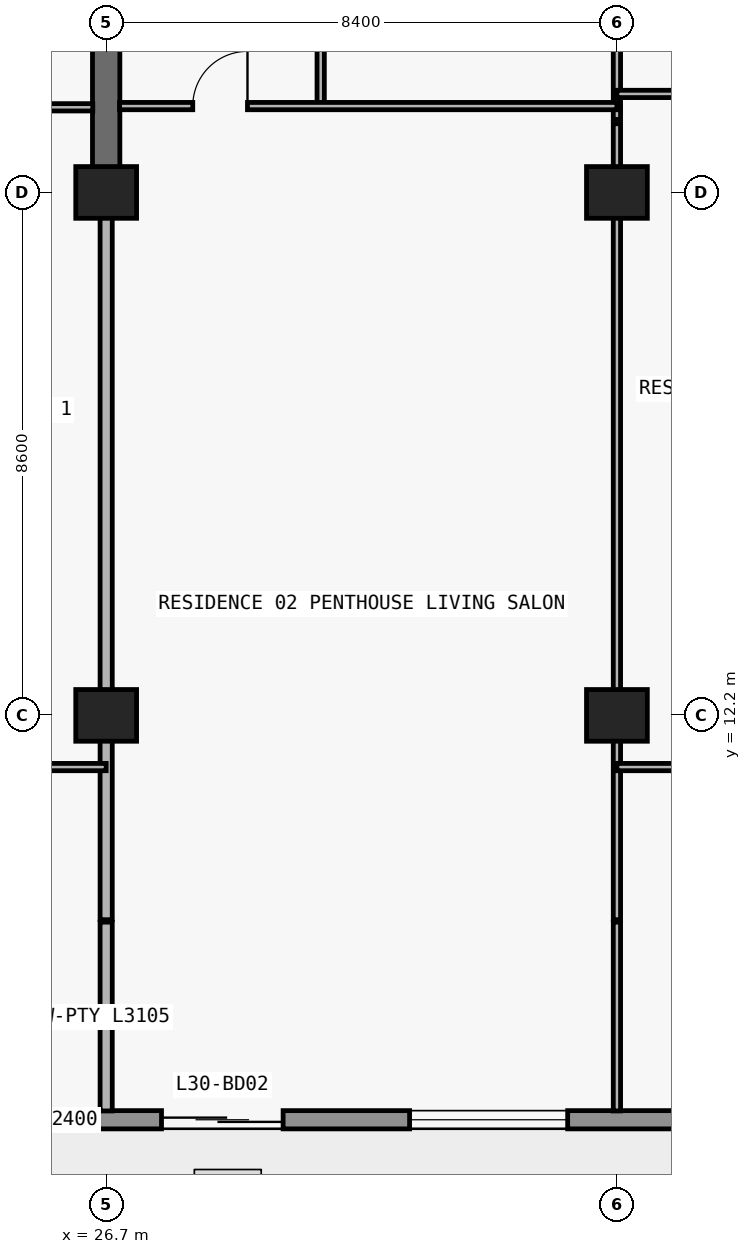
"""IFC4 building model, lengths in metres.
Left out: names, types, materials, properties, quantities, classifications, styles, units other than length and angle.
Written with IfcOpenShell. Run it as: python <this file> out.ifc"""

import sys

from ifc_helpers import new_model, si_unit, direction, frame, frame_2d, origin, origin_2d, place, context, subcontext, project, spatial, rectangle, extrude, element, fill, save


model = new_model("IFC4")
c1 = context("Model", 3, precision=1e-05, world=origin(), true_north=direction((0.0, 1.0)))
c2 = subcontext(c1, "Body", "Model", "MODEL_VIEW")
j1 = project(units=[si_unit("LENGTHUNIT", "METRE"), si_unit("PLANEANGLEUNIT", "RADIAN")], contexts=[c1])
p1 = place(None, origin())
s1 = spatial("IfcSite", under=j1, at=p1, CompositionType="ELEMENT")
p2 = place(p1, origin())
s2 = spatial("IfcBuilding", under=s1, at=p2, CompositionType="ELEMENT")
p3 = place(p2, frame((0.0, 0.0, 112.5)))
s3 = spatial("IfcBuildingStorey", under=s2, at=p3, CompositionType="ELEMENT", Elevation=112.5)
for number, where, z_axis, x_axis in (
    (1, (26.7, 12.2, 0.0), (0.0, 0.0, 1.0), (1.0, 0.0, 0.0)),
    (2, (35.1, 12.2, 0.0), (0.0, 0.0, 1.0), (1.0, 0.0, 0.0)),
    (3, (26.7, 20.8, 0.0), (0.0, 0.0, 1.0), (1.0, 0.0, 0.0)),
    (4, (35.1, 20.8, 0.0), (0.0, 0.0, 1.0), (1.0, 0.0, 0.0)),
):
    element("IfcColumn", number, at=place(p3, frame(where, z_axis=z_axis, x_axis=x_axis)), inside=s3, PredefinedType="COLUMN", context=c2, shape_type="SweptSolid", body=[
        extrude(rectangle(XDim=1.0, YDim=0.85, at=origin_2d()), origin(), (0.0, 0.0, 1.0), 3.05),
    ])
p4 = place(p3, frame((26.7, 20.8, 0.0), z_axis=(0.0, 0.0, 1.0), x_axis=(0.0, 1.0, 0.0)))
e5 = element("IfcWall", 5, at=p4, inside=s3, PredefinedType="SHEAR", context=c2, shape_type="SweptSolid", body=[
    extrude(rectangle(XDim=8.6, YDim=0.45, at=frame_2d((4.3, 0.0))), origin(), (0.0, 0.0, 1.0), 3.05),
])
p5 = place(p3, frame((70.1, 5.55, 0.0), z_axis=(0.0, 0.0, 1.0), x_axis=(-1.0, 0.0, 0.0)))
e6 = element("IfcWall", 6, at=p5, inside=s3, PredefinedType="STANDARD", context=c2, shape_type="SweptSolid", body=[
    extrude(rectangle(XDim=62.4, YDim=0.3, at=frame_2d((31.2, 0.0))), origin(), (0.0, 0.0, 1.0), 3.05),
])
p6 = place(p5, frame((57.29, 0.0, 0.0)))
e7 = element("IfcOpeningElement", 7, at=p6, cuts=e6, PredefinedType="OPENING", context=c2, shape_type="SweptSolid", body=[
    extrude(rectangle(XDim=2.0, YDim=2.3, at=frame_2d((1.0, 1.15))), frame((0.0, 0.16, 0.0), z_axis=(0.0, -1.0, 0.0), x_axis=(1.0, 0.0, 0.0)), (0.0, 0.0, 1.0), 0.32),
])
p7 = place(p5, frame((52.61, 0.0, 0.65)))
e8 = element("IfcOpeningElement", 8, at=p7, cuts=e6, PredefinedType="OPENING", context=c2, shape_type="SweptSolid", body=[
    extrude(rectangle(XDim=2.6, YDim=1.85, at=frame_2d((1.3, 0.925))), frame((0.0, 0.16, 0.0), z_axis=(0.0, -1.0, 0.0), x_axis=(1.0, 0.0, 0.0)), (0.0, 0.0, 1.0), 0.32),
])
p8 = place(p5, frame((46.5, 0.0, 0.85)))
e9 = element("IfcOpeningElement", 9, at=p8, cuts=e6, PredefinedType="OPENING", context=c2, shape_type="SweptSolid", body=[
    extrude(rectangle(XDim=2.2, YDim=1.55, at=frame_2d((1.1, 0.775))), frame((0.0, 0.16, 0.0), z_axis=(0.0, -1.0, 0.0), x_axis=(1.0, 0.0, 0.0)), (0.0, 0.0, 1.0), 0.32),
])
p9 = place(p5, frame((40.49, 0.0, 0.0)))
e10 = element("IfcOpeningElement", 10, at=p9, cuts=e6, PredefinedType="OPENING", context=c2, shape_type="SweptSolid", body=[
    extrude(rectangle(XDim=2.0, YDim=2.3, at=frame_2d((1.0, 1.15))), frame((0.0, 0.16, 0.0), z_axis=(0.0, -1.0, 0.0), x_axis=(1.0, 0.0, 0.0)), (0.0, 0.0, 1.0), 0.32),
])
p10 = place(p5, frame((35.81, 0.0, 0.65)))
e11 = element("IfcOpeningElement", 11, at=p10, cuts=e6, PredefinedType="OPENING", context=c2, shape_type="SweptSolid", body=[
    extrude(rectangle(XDim=2.6, YDim=1.85, at=frame_2d((1.3, 0.925))), frame((0.0, 0.16, 0.0), z_axis=(0.0, -1.0, 0.0), x_axis=(1.0, 0.0, 0.0)), (0.0, 0.0, 1.0), 0.32),
])
p11 = place(p5, frame((30.1, 0.0, 0.85)))
e12 = element("IfcOpeningElement", 12, at=p11, cuts=e6, PredefinedType="OPENING", context=c2, shape_type="SweptSolid", body=[
    extrude(rectangle(XDim=2.2, YDim=1.55, at=frame_2d((1.1, 0.775))), frame((0.0, 0.16, 0.0), z_axis=(0.0, -1.0, 0.0), x_axis=(1.0, 0.0, 0.0)), (0.0, 0.0, 1.0), 0.32),
])
p12 = place(p5, frame((24.426, 0.0, 0.0)))
e13 = element("IfcOpeningElement", 13, at=p12, cuts=e6, PredefinedType="OPENING", context=c2, shape_type="SweptSolid", body=[
    extrude(rectangle(XDim=2.0, YDim=2.3, at=frame_2d((1.0, 1.15))), frame((0.0, 0.16, 0.0), z_axis=(0.0, -1.0, 0.0), x_axis=(1.0, 0.0, 0.0)), (0.0, 0.0, 1.0), 0.32),
])
p13 = place(p5, frame((20.126, 0.0, 0.85)))
e14 = element("IfcOpeningElement", 14, at=p13, cuts=e6, PredefinedType="OPENING", context=c2, shape_type="SweptSolid", body=[
    extrude(rectangle(XDim=2.2, YDim=1.55, at=frame_2d((1.1, 0.775))), frame((0.0, 0.16, 0.0), z_axis=(0.0, -1.0, 0.0), x_axis=(1.0, 0.0, 0.0)), (0.0, 0.0, 1.0), 0.32),
])
p14 = place(p5, frame((15.69, 0.0, 0.0)))
e15 = element("IfcOpeningElement", 15, at=p14, cuts=e6, PredefinedType="OPENING", context=c2, shape_type="SweptSolid", body=[
    extrude(rectangle(XDim=2.0, YDim=2.3, at=frame_2d((1.0, 1.15))), frame((0.0, 0.16, 0.0), z_axis=(0.0, -1.0, 0.0), x_axis=(1.0, 0.0, 0.0)), (0.0, 0.0, 1.0), 0.32),
])
p15 = place(p5, frame((11.59, 0.0, 0.85)))
e16 = element("IfcOpeningElement", 16, at=p15, cuts=e6, PredefinedType="OPENING", context=c2, shape_type="SweptSolid", body=[
    extrude(rectangle(XDim=1.8, YDim=1.55, at=frame_2d((0.9, 0.775))), frame((0.0, 0.16, 0.0), z_axis=(0.0, -1.0, 0.0), x_axis=(1.0, 0.0, 0.0)), (0.0, 0.0, 1.0), 0.32),
])
p16 = place(p5, frame((7.626, 0.0, 0.0)))
e17 = element("IfcOpeningElement", 17, at=p16, cuts=e6, PredefinedType="OPENING", context=c2, shape_type="SweptSolid", body=[
    extrude(rectangle(XDim=2.0, YDim=2.3, at=frame_2d((1.0, 1.15))), frame((0.0, 0.16, 0.0), z_axis=(0.0, -1.0, 0.0), x_axis=(1.0, 0.0, 0.0)), (0.0, 0.0, 1.0), 0.32),
])
p17 = place(p5, frame((3.326, 0.0, 0.85)))
e18 = element("IfcOpeningElement", 18, at=p17, cuts=e6, PredefinedType="OPENING", context=c2, shape_type="SweptSolid", body=[
    extrude(rectangle(XDim=2.2, YDim=1.55, at=frame_2d((1.1, 0.775))), frame((0.0, 0.16, 0.0), z_axis=(0.0, -1.0, 0.0), x_axis=(1.0, 0.0, 0.0)), (0.0, 0.0, 1.0), 0.32),
])
p18 = place(p3, frame((26.7, 5.695, 0.0), z_axis=(0.0, 0.0, 1.0), x_axis=(0.0, 1.0, 0.0)))
e19 = element("IfcWall", 19, at=p18, inside=s3, PredefinedType="PARTITIONING", context=c2, shape_type="SweptSolid", body=[
    extrude(rectangle(XDim=3.105, YDim=0.2, at=frame_2d((1.552, 0.0))), origin(), (0.0, 0.0, 1.0), 3.05),
])
p19 = place(p3, frame((26.7, 8.84, 0.0), z_axis=(0.0, 0.0, 1.0), x_axis=(0.0, 1.0, 0.0)))
e20 = element("IfcWall", 20, at=p19, inside=s3, PredefinedType="PARTITIONING", context=c2, shape_type="SweptSolid", body=[
    extrude(rectangle(XDim=11.955, YDim=0.2, at=frame_2d((5.978, 0.0))), origin(), (0.0, 0.0, 1.0), 2.174),
])
p20 = place(p3, frame((30.228, 22.22, 0.0), z_axis=(0.0, 0.0, 1.0), x_axis=(0.0, 1.0, 0.0)))
e21 = element("IfcWall", 21, at=p20, inside=s3, PredefinedType="PARTITIONING", context=c2, shape_type="SweptSolid", body=[
    extrude(rectangle(XDim=4.38, YDim=0.12, at=frame_2d((2.19, 0.0))), origin(), (0.0, 0.0, 1.0), 3.05),
])
p21 = place(p20, frame((1.74, 0.0, 0.0)))
e22 = element("IfcOpeningElement", 22, at=p21, cuts=e21, PredefinedType="OPENING", context=c2, shape_type="SweptSolid", body=[
    extrude(rectangle(XDim=0.9, YDim=2.15, at=frame_2d((0.45, 1.075))), frame((0.0, 0.07, 0.0), z_axis=(0.0, -1.0, 0.0), x_axis=(1.0, 0.0, 0.0)), (0.0, 0.0, 1.0), 0.14),
])
p22 = place(p3, frame((35.1, 5.695, 0.0), z_axis=(0.0, 0.0, 1.0), x_axis=(0.0, 1.0, 0.0)))
e23 = element("IfcWall", 23, at=p22, inside=s3, PredefinedType="PARTITIONING", context=c2, shape_type="SweptSolid", body=[
    extrude(rectangle(XDim=3.105, YDim=0.12, at=frame_2d((1.552, 0.0))), origin(), (0.0, 0.0, 1.0), 3.05),
])
p23 = place(p3, frame((35.1, 8.84, 0.0), z_axis=(0.0, 0.0, 1.0), x_axis=(0.0, 1.0, 0.0)))
e24 = element("IfcWall", 24, at=p23, inside=s3, PredefinedType="PARTITIONING", context=c2, shape_type="SweptSolid", body=[
    extrude(rectangle(XDim=13.09, YDim=0.12, at=frame_2d((6.545, 0.0))), origin(), (0.0, 0.0, 1.0), 2.174),
])
p24 = place(p3, frame((35.1, 22.0, 0.0), z_axis=(0.0, 0.0, 1.0), x_axis=(0.0, 1.0, 0.0)))
e25 = element("IfcWall", 25, at=p24, inside=s3, PredefinedType="PARTITIONING", context=c2, shape_type="SweptSolid", body=[
    extrude(rectangle(XDim=0.2, YDim=0.12, at=frame_2d((0.1, 0.0))), origin(), (0.0, 0.0, 1.0), 2.174),
])
p25 = place(p3, frame((35.1, 22.22, 0.0), z_axis=(0.0, 0.0, 1.0), x_axis=(0.0, 1.0, 0.0)))
e26 = element("IfcWall", 26, at=p25, inside=s3, PredefinedType="PARTITIONING", context=c2, shape_type="SweptSolid", body=[
    extrude(rectangle(XDim=4.38, YDim=0.12, at=frame_2d((2.19, 0.0))), origin(), (0.0, 0.0, 1.0), 2.174),
])
p26 = place(p25, frame((1.84, 0.0, 0.0)))
e27 = element("IfcOpeningElement", 27, at=p26, cuts=e26, PredefinedType="OPENING", context=c2, shape_type="SweptSolid", body=[
    extrude(rectangle(XDim=0.9, YDim=2.124, at=frame_2d((0.45, 1.062))), frame((0.0, 0.07, 0.0), z_axis=(0.0, -1.0, 0.0), x_axis=(1.0, 0.0, 0.0)), (0.0, 0.0, 1.0), 0.14),
])
p27 = place(p3, frame((18.3, 11.35, 0.0), z_axis=(0.0, 0.0, 1.0), x_axis=(1.0, 0.0, 0.0)))
e28 = element("IfcWall", 28, at=p27, inside=s3, PredefinedType="PARTITIONING", context=c2, shape_type="SweptSolid", body=[
    extrude(rectangle(XDim=8.4, YDim=0.12, at=frame_2d((4.2, 0.0))), origin(), (0.0, 0.0, 1.0), 3.05),
])
p28 = place(p27, frame((3.75, 0.0, 0.0)))
e29 = element("IfcOpeningElement", 29, at=p28, cuts=e28, PredefinedType="OPENING", context=c2, shape_type="SweptSolid", body=[
    extrude(rectangle(XDim=0.9, YDim=2.15, at=frame_2d((0.45, 1.075))), frame((0.0, 0.07, 0.0), z_axis=(0.0, -1.0, 0.0), x_axis=(1.0, 0.0, 0.0)), (0.0, 0.0, 1.0), 0.14),
])
p29 = place(p3, frame((35.1, 11.35, 0.0), z_axis=(0.0, 0.0, 1.0), x_axis=(1.0, 0.0, 0.0)))
e30 = element("IfcWall", 30, at=p29, inside=s3, PredefinedType="PARTITIONING", context=c2, shape_type="SweptSolid", body=[
    extrude(rectangle(XDim=7.6, YDim=0.12, at=frame_2d((3.8, 0.0))), origin(), (0.0, 0.0, 1.0), 3.05),
])
p30 = place(p29, frame((3.35, 0.0, 0.0)))
e31 = element("IfcOpeningElement", 31, at=p30, cuts=e30, PredefinedType="OPENING", context=c2, shape_type="SweptSolid", body=[
    extrude(rectangle(XDim=0.9, YDim=2.15, at=frame_2d((0.45, 1.075))), frame((0.0, 0.07, 0.0), z_axis=(0.0, -1.0, 0.0), x_axis=(1.0, 0.0, 0.0)), (0.0, 0.0, 1.0), 0.14),
])
p31 = place(p3, frame((18.3, 22.2, 0.0), z_axis=(0.0, 0.0, 1.0), x_axis=(1.0, 0.0, 0.0)))
e32 = element("IfcWall", 32, at=p31, inside=s3, PredefinedType="PARTITIONING", context=c2, shape_type="SweptSolid", body=[
    extrude(rectangle(XDim=8.18, YDim=0.12, at=frame_2d((4.09, 0.0))), origin(), (0.0, 0.0, 1.0), 3.05),
])
p32 = place(p31, frame((3.64, 0.0, 0.0)))
e33 = element("IfcOpeningElement", 33, at=p32, cuts=e32, PredefinedType="OPENING", context=c2, shape_type="SweptSolid", body=[
    extrude(rectangle(XDim=0.9, YDim=2.15, at=frame_2d((0.45, 1.075))), frame((0.0, 0.07, 0.0), z_axis=(0.0, -1.0, 0.0), x_axis=(1.0, 0.0, 0.0)), (0.0, 0.0, 1.0), 0.14),
])
p33 = place(p3, frame((26.92, 22.22, 0.0), z_axis=(0.0, 0.0, 1.0), x_axis=(1.0, 0.0, 0.0)))
e34 = element("IfcWall", 34, at=p33, inside=s3, PredefinedType="PARTITIONING", context=c2, shape_type="SweptSolid", body=[
    extrude(rectangle(XDim=8.18, YDim=0.12, at=frame_2d((4.09, 0.0))), origin(), (0.0, 0.0, 1.0), 3.05),
])
p34 = place(p33, frame((1.204, 0.0, 0.0)))
e35 = element("IfcOpeningElement", 35, at=p34, cuts=e34, PredefinedType="OPENING", context=c2, shape_type="SweptSolid", body=[
    extrude(rectangle(XDim=0.9, YDim=2.15, at=frame_2d((0.45, 1.075))), frame((0.0, 0.07, 0.0), z_axis=(0.0, -1.0, 0.0), x_axis=(1.0, 0.0, 0.0)), (0.0, 0.0, 1.0), 0.14),
])
p35 = place(p3, frame((35.1, 22.42, 0.0), z_axis=(0.0, 0.0, 1.0), x_axis=(1.0, 0.0, 0.0)))
e36 = element("IfcWall", 36, at=p35, inside=s3, PredefinedType="PARTITIONING", context=c2, shape_type="SweptSolid", body=[
    extrude(rectangle(XDim=7.6, YDim=0.12, at=frame_2d((3.8, 0.0))), origin(), (0.0, 0.0, 1.0), 3.05),
])
p36 = place(p35, frame((3.35, 0.0, 0.0)))
e37 = element("IfcOpeningElement", 37, at=p36, cuts=e36, PredefinedType="OPENING", context=c2, shape_type="SweptSolid", body=[
    extrude(rectangle(XDim=0.9, YDim=2.15, at=frame_2d((0.45, 1.075))), frame((0.0, 0.07, 0.0), z_axis=(0.0, -1.0, 0.0), x_axis=(1.0, 0.0, 0.0)), (0.0, 0.0, 1.0), 0.14),
])
p37 = place(p9, origin())
e38 = element("IfcDoor", 38, at=p37, inside=s3, OperationType="DOUBLE_DOOR_SLIDING", PredefinedType="DOOR", context=c2, shape_type="SweptSolid", body=[
    extrude(rectangle(XDim=2.0, YDim=2.3, at=frame_2d((1.0, 1.15))), frame((0.0, 0.025, 0.0), z_axis=(0.0, -1.0, 0.0), x_axis=(1.0, 0.0, 0.0)), (0.0, 0.0, 1.0), 0.05),
])
fill(e10, e38)
p38 = place(p10, origin())
e39 = element("IfcWindow", 39, at=p38, inside=s3, PartitioningType="SINGLE_PANEL", PredefinedType="WINDOW", context=c2, shape_type="SweptSolid", body=[
    extrude(rectangle(XDim=2.6, YDim=1.85, at=frame_2d((1.3, 0.925))), frame((0.0, 0.03, 0.0), z_axis=(0.0, -1.0, 0.0), x_axis=(1.0, 0.0, 0.0)), (0.0, 0.0, 1.0), 0.06),
])
fill(e11, e39)
p39 = place(p34, origin())
e40 = element("IfcDoor", 40, at=p39, inside=s3, OperationType="SINGLE_SWING_RIGHT", PredefinedType="DOOR", context=c2, shape_type="SweptSolid", body=[
    extrude(rectangle(XDim=0.9, YDim=2.15, at=frame_2d((0.45, 1.075))), frame((0.0, 0.025, 0.0), z_axis=(0.0, -1.0, 0.0), x_axis=(1.0, 0.0, 0.0)), (0.0, 0.0, 1.0), 0.05),
])
fill(e35, e40)
save(model, sys.argv[1])
